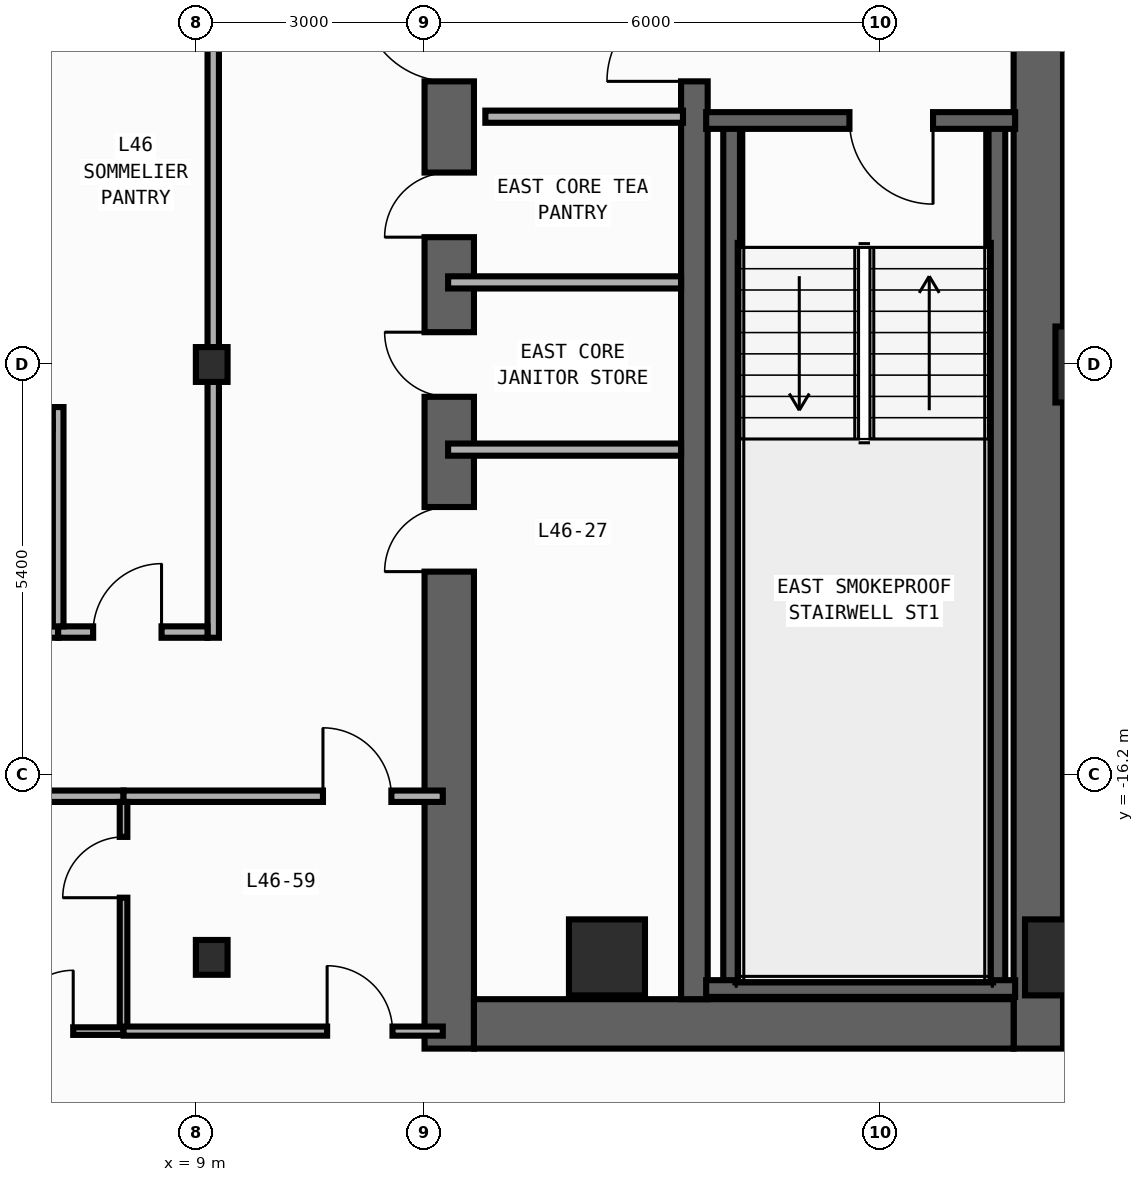
"""IFC4 building model, lengths in metres.
Left out: names, types, materials, properties, quantities, classifications, styles, units other than length and angle.
Written with IfcOpenShell. Run it as: python <this file> out.ifc"""

import sys

from ifc_helpers import new_model, si_unit, direction, frame, frame_2d, origin, origin_2d, place, context, subcontext, project, spatial, rectangle, i_section, extrude, element, fill, save


model = new_model("IFC4")
c1 = context("Model", 3, precision=1e-05, world=origin(), true_north=direction((0.0, 1.0)))
c2 = subcontext(c1, "Body", "Model", "MODEL_VIEW")
j1 = project(units=[si_unit("LENGTHUNIT", "METRE"), si_unit("PLANEANGLEUNIT", "RADIAN")], contexts=[c1])
p1 = place(None, origin())
s1 = spatial("IfcSite", under=j1, at=p1, CompositionType="ELEMENT")
p2 = place(p1, origin())
s2 = spatial("IfcBuilding", under=s1, at=p2, CompositionType="ELEMENT")
p3 = place(p2, frame((0.0, 0.0, 199.2)))
s3 = spatial("IfcBuildingStorey", under=s2, at=p3, CompositionType="ELEMENT", Elevation=199.2)
p4 = place(p3, frame((12.325, -19.8, 0.0), z_axis=(0.0, 0.0, 1.0), x_axis=(0.0, 1.0, 0.0)))
e1 = element("IfcWall", 1, at=p4, inside=s3, PredefinedType="SHEAR", context=c2, shape_type="SweptSolid", body=[
    extrude(rectangle(XDim=27.0, YDim=0.65, at=frame_2d((13.5, 0.0))), origin(), (0.0, 0.0, 1.0), 3.54),
])
p5 = place(p4, frame((23.05, 0.0, 0.0)))
e2 = element("IfcOpeningElement", 2, at=p5, cuts=e1, PredefinedType="OPENING", context=c2, shape_type="SweptSolid", body=[
    extrude(rectangle(XDim=1.1, YDim=2.2, at=frame_2d((0.55, 1.1))), frame((0.0, 0.335, 0.0), z_axis=(0.0, -1.0, 0.0), x_axis=(1.0, 0.0, 0.0)), (0.0, 0.0, 1.0), 0.67),
])
p6 = place(p4, frame((19.85, 0.0, 0.0)))
e3 = element("IfcOpeningElement", 3, at=p6, cuts=e1, PredefinedType="OPENING", context=c2, shape_type="SweptSolid", body=[
    extrude(rectangle(XDim=1.1, YDim=2.2, at=frame_2d((0.55, 1.1))), frame((0.0, 0.335, 0.0), z_axis=(0.0, -1.0, 0.0), x_axis=(1.0, 0.0, 0.0)), (0.0, 0.0, 1.0), 0.67),
])
p7 = place(p4, frame((16.65, 0.0, 0.0)))
e4 = element("IfcOpeningElement", 4, at=p7, cuts=e1, PredefinedType="OPENING", context=c2, shape_type="SweptSolid", body=[
    extrude(rectangle(XDim=1.1, YDim=2.2, at=frame_2d((0.55, 1.1))), frame((0.0, 0.335, 0.0), z_axis=(0.0, -1.0, 0.0), x_axis=(1.0, 0.0, 0.0)), (0.0, 0.0, 1.0), 0.67),
])
p8 = place(p4, frame((6.275, 0.0, 0.0)))
e5 = element("IfcOpeningElement", 5, at=p8, cuts=e1, PredefinedType="OPENING", context=c2, shape_type="SweptSolid", body=[
    extrude(rectangle(XDim=0.85, YDim=2.1, at=frame_2d((0.425, 1.05))), frame((0.0, 0.335, 0.0), z_axis=(0.0, -1.0, 0.0), x_axis=(1.0, 0.0, 0.0)), (0.0, 0.0, 1.0), 0.67),
])
p9 = place(p4, frame((8.575, 0.0, 0.0)))
e6 = element("IfcOpeningElement", 6, at=p9, cuts=e1, PredefinedType="OPENING", context=c2, shape_type="SweptSolid", body=[
    extrude(rectangle(XDim=0.85, YDim=2.1, at=frame_2d((0.425, 1.05))), frame((0.0, 0.335, 0.0), z_axis=(0.0, -1.0, 0.0), x_axis=(1.0, 0.0, 0.0)), (0.0, 0.0, 1.0), 0.67),
])
p10 = place(p4, frame((10.675, 0.0, 0.0)))
e7 = element("IfcOpeningElement", 7, at=p10, cuts=e1, PredefinedType="OPENING", context=c2, shape_type="SweptSolid", body=[
    extrude(rectangle(XDim=0.85, YDim=2.1, at=frame_2d((0.425, 1.05))), frame((0.0, 0.335, 0.0), z_axis=(0.0, -1.0, 0.0), x_axis=(1.0, 0.0, 0.0)), (0.0, 0.0, 1.0), 0.67),
])
p11 = place(p4, frame((12.725, 0.0, 0.0)))
e8 = element("IfcOpeningElement", 8, at=p11, cuts=e1, PredefinedType="OPENING", context=c2, shape_type="SweptSolid", body=[
    extrude(rectangle(XDim=1.15, YDim=2.2, at=frame_2d((0.575, 1.1))), frame((0.0, 0.335, 0.0), z_axis=(0.0, -1.0, 0.0), x_axis=(1.0, 0.0, 0.0)), (0.0, 0.0, 1.0), 0.67),
])
p12 = place(p4, frame((25.125, 0.0, 0.0)))
e9 = element("IfcOpeningElement", 9, at=p12, cuts=e1, PredefinedType="OPENING", context=c2, shape_type="SweptSolid", body=[
    extrude(rectangle(XDim=0.85, YDim=2.1, at=frame_2d((0.425, 1.05))), frame((0.0, 0.335, 0.0), z_axis=(0.0, -1.0, 0.0), x_axis=(1.0, 0.0, 0.0)), (0.0, 0.0, 1.0), 0.67),
])
p13 = place(p3, frame((20.075, -19.8, 0.0), z_axis=(0.0, 0.0, 1.0), x_axis=(0.0, 1.0, 0.0)))
e10 = element("IfcWall", 10, at=p13, inside=s3, PredefinedType="SHEAR", context=c2, shape_type="SweptSolid", body=[
    extrude(rectangle(XDim=27.0, YDim=0.65, at=frame_2d((13.5, 0.0))), origin(), (0.0, 0.0, 1.0), 3.54),
])
p14 = place(p3, frame((12.65, -19.475, 0.0), z_axis=(0.0, 0.0, 1.0), x_axis=(1.0, 0.0, 0.0)))
e11 = element("IfcWall", 11, at=p14, inside=s3, PredefinedType="SHEAR", context=c2, shape_type="SweptSolid", body=[
    extrude(rectangle(XDim=7.1, YDim=0.65, at=frame_2d((3.55, 0.0))), origin(), (0.0, 0.0, 1.0), 3.54),
])
p15 = place(p3, frame((15.55, -19.15, 0.0), z_axis=(0.0, 0.0, 1.0), x_axis=(0.0, 1.0, 0.0)))
e12 = element("IfcWall", 12, at=p15, inside=s3, PredefinedType="SHEAR", context=c2, shape_type="SweptSolid", body=[
    extrude(rectangle(XDim=25.7, YDim=0.35, at=frame_2d((12.85, 0.0))), origin(), (0.0, 0.0, 1.0), 3.54),
])
p16 = place(p15, frame((12.075, 0.0, 0.0)))
e13 = element("IfcOpeningElement", 13, at=p16, cuts=e12, PredefinedType="OPENING", context=c2, shape_type="SweptSolid", body=[
    extrude(rectangle(XDim=1.15, YDim=2.2, at=frame_2d((0.575, 1.1))), frame((0.0, 0.185, 0.0), z_axis=(0.0, -1.0, 0.0), x_axis=(1.0, 0.0, 0.0)), (0.0, 0.0, 1.0), 0.37),
])
p17 = place(p15, frame((24.475, 0.0, 0.0)))
e14 = element("IfcOpeningElement", 14, at=p17, cuts=e12, PredefinedType="OPENING", context=c2, shape_type="SweptSolid", body=[
    extrude(rectangle(XDim=0.85, YDim=2.1, at=frame_2d((0.425, 1.05))), frame((0.0, 0.185, 0.0), z_axis=(0.0, -1.0, 0.0), x_axis=(1.0, 0.0, 0.0)), (0.0, 0.0, 1.0), 0.37),
])
for number, where, z_axis, x_axis in (
    (15, (16.04, -19.01, 0.0), (0.0, 0.0, 1.0), (0.0, 1.0, 0.0)),
    (16, (19.53, -19.01, 0.0), (0.0, 0.0, 1.0), (0.0, 1.0, 0.0)),
):
    element("IfcWall", number, at=place(p3, frame(where, z_axis=z_axis, x_axis=x_axis)), inside=s3, PredefinedType="SHEAR", context=c2, shape_type="SweptSolid", body=[
        extrude(rectangle(XDim=11.42, YDim=0.22, at=frame_2d((5.71, 0.0))), origin(), (0.0, 0.0, 1.0), 3.54),
    ])
p18 = place(p3, frame((15.705, -19.01, 0.0), z_axis=(0.0, 0.0, 1.0), x_axis=(1.0, 0.0, 0.0)))
e17 = element("IfcWall", 17, at=p18, inside=s3, PredefinedType="SHEAR", context=c2, shape_type="SweptSolid", body=[
    extrude(rectangle(XDim=4.065, YDim=0.22, at=frame_2d((2.032, 0.0))), origin(), (0.0, 0.0, 1.0), 3.54),
])
p19 = place(p3, frame((19.77, -7.59, 0.0), z_axis=(0.0, 0.0, 1.0), x_axis=(-1.0, 0.0, 0.0)))
e18 = element("IfcWall", 18, at=p19, inside=s3, PredefinedType="SHEAR", context=c2, shape_type="SweptSolid", body=[
    extrude(rectangle(XDim=4.065, YDim=0.22, at=frame_2d((2.032, 0.0))), origin(), (0.0, 0.0, 1.0), 3.54),
])
p20 = place(p19, frame((1.08, 0.0, 0.0)))
e19 = element("IfcOpeningElement", 19, at=p20, cuts=e18, PredefinedType="OPENING", context=c2, shape_type="SweptSolid", body=[
    extrude(rectangle(XDim=1.1, YDim=2.2, at=frame_2d((0.55, 1.1))), frame((0.0, 0.12, 0.0), z_axis=(0.0, -1.0, 0.0), x_axis=(1.0, 0.0, 0.0)), (0.0, 0.0, 1.0), 0.24),
])
for number, where, z_axis, x_axis in (
    (20, (9.2, -18.6, 0.0), (0.0, 0.0, 1.0), (1.0, 0.0, 0.0)),
    (21, (9.2, -10.8, 0.0), (0.0, 0.0, 1.0), (1.0, 0.0, 0.0)),
):
    element("IfcColumn", number, at=place(p3, frame(where, z_axis=z_axis, x_axis=x_axis)), inside=s3, PredefinedType="COLUMN", context=c2, shape_type="SweptSolid", body=[
        extrude(i_section(OverallWidth=0.417, OverallDepth=0.458, WebThickness=0.03, FlangeThickness=0.05, FilletRadius=0.022, at=origin_2d()), origin(), (0.0, 0.0, 1.0), 3.8),
    ])
for number, where, z_axis, x_axis in (
    (22, (20.4, -18.6, 0.0), (0.0, 0.0, 1.0), (1.0, 0.0, 0.0)),
    (23, (14.4, -18.6, 0.0), (0.0, 0.0, 1.0), (1.0, 0.0, 0.0)),
    (24, (20.8, -10.8, 0.0), (0.0, 0.0, 1.0), (1.0, 0.0, 0.0)),
):
    element("IfcColumn", number, at=place(p3, frame(where, z_axis=z_axis, x_axis=x_axis)), inside=s3, PredefinedType="COLUMN", context=c2, shape_type="SweptSolid", body=[
        extrude(rectangle(XDim=1.0, YDim=1.0, at=origin_2d()), origin(), (0.0, 0.0, 1.0), 3.8),
    ])
p21 = place(p3, frame((12.8, -7.54, 0.0), z_axis=(0.0, 0.0, 1.0), x_axis=(1.0, 0.0, 0.0)))
e25 = element("IfcWall", 25, at=p21, inside=s3, PredefinedType="STANDARD", context=c2, shape_type="SweptSolid", body=[
    extrude(rectangle(XDim=2.6, YDim=0.16, at=frame_2d((1.3, 0.0))), origin(), (0.0, 0.0, 1.0), 3.54),
])
for number, where, z_axis, x_axis in (
    (26, (12.31, -11.92, 0.0), (0.0, 0.0, 1.0), (1.0, 0.0, 0.0)),
    (27, (12.31, -9.72, 0.0), (0.0, 0.0, 1.0), (1.0, 0.0, 0.0)),
):
    element("IfcWall", number, at=place(p3, frame(where, z_axis=z_axis, x_axis=x_axis)), inside=s3, PredefinedType="PARTITIONING", context=c2, shape_type="SweptSolid", body=[
        extrude(rectangle(XDim=3.065, YDim=0.16, at=frame_2d((1.532, 0.0))), origin(), (0.0, 0.0, 1.0), 3.54),
    ])
p22 = place(p3, frame((9.22, -14.395, 0.0), z_axis=(0.0, 0.0, 1.0), x_axis=(0.0, 1.0, 0.0)))
e28 = element("IfcWall", 28, at=p22, inside=s3, PredefinedType="PARTITIONING", context=c2, shape_type="SweptSolid", body=[
    extrude(rectangle(XDim=12.595, YDim=0.15, at=frame_2d((6.297, 0.0))), origin(), (0.0, 0.0, 1.0), 2.952),
])
p23 = place(p22, frame((8.592, 0.0, 0.0)))
e29 = element("IfcOpeningElement", 29, at=p23, cuts=e28, PredefinedType="OPENING", context=c2, shape_type="SweptSolid", body=[
    extrude(rectangle(XDim=0.9, YDim=2.15, at=frame_2d((0.45, 1.075))), frame((0.0, 0.085, 0.0), z_axis=(0.0, -1.0, 0.0), x_axis=(1.0, 0.0, 0.0)), (0.0, 0.0, 1.0), 0.17),
])
p24 = place(p3, frame((4.28, -14.32, 0.0), z_axis=(0.0, 0.0, 1.0), x_axis=(1.0, 0.0, 0.0)))
e30 = element("IfcWall", 30, at=p24, inside=s3, PredefinedType="PARTITIONING", context=c2, shape_type="SweptSolid", body=[
    extrude(rectangle(XDim=2.9, YDim=0.15, at=frame_2d((1.45, 0.0))), origin(), (0.0, 0.0, 1.0), 3.54),
])
p25 = place(p24, frame((1.54, 0.0, 0.0)))
e31 = element("IfcOpeningElement", 31, at=p25, cuts=e30, PredefinedType="OPENING", context=c2, shape_type="SweptSolid", body=[
    extrude(rectangle(XDim=0.9, YDim=2.15, at=frame_2d((0.45, 1.075))), frame((0.0, 0.085, 0.0), z_axis=(0.0, -1.0, 0.0), x_axis=(1.0, 0.0, 0.0)), (0.0, 0.0, 1.0), 0.17),
])
p26 = place(p3, frame((7.18, -14.32, 0.0), z_axis=(0.0, 0.0, 1.0), x_axis=(1.0, 0.0, 0.0)))
e32 = element("IfcWall", 32, at=p26, inside=s3, PredefinedType="PARTITIONING", context=c2, shape_type="SweptSolid", body=[
    extrude(rectangle(XDim=1.965, YDim=0.15, at=frame_2d((0.982, 0.0))), origin(), (0.0, 0.0, 1.0), 3.54),
])
p27 = place(p26, frame((0.46, 0.0, 0.0)))
e33 = element("IfcOpeningElement", 33, at=p27, cuts=e32, PredefinedType="OPENING", context=c2, shape_type="SweptSolid", body=[
    extrude(rectangle(XDim=0.9, YDim=2.15, at=frame_2d((0.45, 1.075))), frame((0.0, 0.085, 0.0), z_axis=(0.0, -1.0, 0.0), x_axis=(1.0, 0.0, 0.0)), (0.0, 0.0, 1.0), 0.17),
])
p28 = place(p3, frame((4.5, -16.48, 0.0), z_axis=(0.0, 0.0, 1.0), x_axis=(1.0, 0.0, 0.0)))
e34 = element("IfcWall", 34, at=p28, inside=s3, PredefinedType="PARTITIONING", context=c2, shape_type="SweptSolid", body=[
    extrude(rectangle(XDim=3.54, YDim=0.15, at=frame_2d((1.77, 0.0))), origin(), (0.0, 0.0, 1.0), 3.54),
])
p29 = place(p3, frame((8.04, -16.48, 0.0), z_axis=(0.0, 0.0, 1.0), x_axis=(1.0, 0.0, 0.0)))
e35 = element("IfcWall", 35, at=p29, inside=s3, PredefinedType="PARTITIONING", context=c2, shape_type="SweptSolid", body=[
    extrude(rectangle(XDim=4.2, YDim=0.15, at=frame_2d((2.1, 0.0))), origin(), (0.0, 0.0, 1.0), 3.54),
])
p30 = place(p29, frame((2.624, 0.0, 0.0)))
e36 = element("IfcOpeningElement", 36, at=p30, cuts=e35, PredefinedType="OPENING", context=c2, shape_type="SweptSolid", body=[
    extrude(rectangle(XDim=0.9, YDim=2.15, at=frame_2d((0.45, 1.075))), frame((0.0, 0.085, 0.0), z_axis=(0.0, -1.0, 0.0), x_axis=(1.0, 0.0, 0.0)), (0.0, 0.0, 1.0), 0.17),
])
p31 = place(p3, frame((7.18, -14.245, 0.0), z_axis=(0.0, 0.0, 1.0), x_axis=(0.0, 1.0, 0.0)))
e37 = element("IfcWall", 37, at=p31, inside=s3, PredefinedType="PARTITIONING", context=c2, shape_type="SweptSolid", body=[
    extrude(rectangle(XDim=2.885, YDim=0.14, at=frame_2d((1.442, 0.0))), origin(), (0.0, 0.0, 1.0), 3.54),
])
p32 = place(p3, frame((8.04, -19.52, 0.0), z_axis=(0.0, 0.0, 1.0), x_axis=(0.0, 1.0, 0.0)))
e38 = element("IfcWall", 38, at=p32, inside=s3, PredefinedType="PARTITIONING", context=c2, shape_type="SweptSolid", body=[
    extrude(rectangle(XDim=2.965, YDim=0.1, at=frame_2d((1.482, 0.0))), origin(), (0.0, 0.0, 1.0), 3.54),
])
p33 = place(p32, frame((1.705, 0.0, 0.0)))
e39 = element("IfcOpeningElement", 39, at=p33, cuts=e38, PredefinedType="OPENING", context=c2, shape_type="SweptSolid", body=[
    extrude(rectangle(XDim=0.8, YDim=2.1, at=frame_2d((0.4, 1.05))), frame((0.0, 0.06, 0.0), z_axis=(0.0, -1.0, 0.0), x_axis=(1.0, 0.0, 0.0)), (0.0, 0.0, 1.0), 0.12),
])
p34 = place(p3, frame((4.5, -19.57, 0.0), z_axis=(0.0, 0.0, 1.0), x_axis=(1.0, 0.0, 0.0)))
e40 = element("IfcWall", 40, at=p34, inside=s3, PredefinedType="PARTITIONING", context=c2, shape_type="SweptSolid", body=[
    extrude(rectangle(XDim=3.54, YDim=0.1, at=frame_2d((1.77, 0.0))), origin(), (0.0, 0.0, 1.0), 3.54),
])
p35 = place(p34, frame((2.078, 0.0, 0.0)))
e41 = element("IfcOpeningElement", 41, at=p35, cuts=e40, PredefinedType="OPENING", context=c2, shape_type="SweptSolid", body=[
    extrude(rectangle(XDim=0.8, YDim=2.1, at=frame_2d((0.4, 1.05))), frame((0.0, 0.06, 0.0), z_axis=(0.0, -1.0, 0.0), x_axis=(1.0, 0.0, 0.0)), (0.0, 0.0, 1.0), 0.12),
])
p36 = place(p3, frame((8.04, -19.57, 0.0), z_axis=(0.0, 0.0, 1.0), x_axis=(1.0, 0.0, 0.0)))
e42 = element("IfcWall", 42, at=p36, inside=s3, PredefinedType="PARTITIONING", context=c2, shape_type="SweptSolid", body=[
    extrude(rectangle(XDim=4.2, YDim=0.12, at=frame_2d((2.1, 0.0))), origin(), (0.0, 0.0, 1.0), 3.54),
])
p37 = place(p36, frame((2.678, 0.0, 0.0)))
e43 = element("IfcOpeningElement", 43, at=p37, cuts=e42, PredefinedType="OPENING", context=c2, shape_type="SweptSolid", body=[
    extrude(rectangle(XDim=0.86, YDim=2.15, at=frame_2d((0.43, 1.075))), frame((0.0, 0.07, 0.0), z_axis=(0.0, -1.0, 0.0), x_axis=(1.0, 0.0, 0.0)), (0.0, 0.0, 1.0), 0.14),
])
p38 = place(p3, frame((4.35, -11.6, 0.0), z_axis=(0.0, 0.0, 1.0), x_axis=(1.0, 0.0, 0.0)))
e44 = element("IfcWall", 44, at=p38, inside=s3, PredefinedType="PARTITIONING", context=c2, shape_type="SweptSolid", body=[
    extrude(rectangle(XDim=2.76, YDim=0.1, at=frame_2d((1.38, 0.0))), origin(), (0.0, 0.0, 1.0), 3.54),
])
p39 = place(p20, origin())
e45 = element("IfcDoor", 45, at=p39, inside=s3, OperationType="SINGLE_SWING_LEFT", PredefinedType="DOOR", context=c2, shape_type="SweptSolid", body=[
    extrude(rectangle(XDim=1.1, YDim=2.2, at=frame_2d((0.55, 1.1))), frame((0.0, 0.025, 0.0), z_axis=(0.0, -1.0, 0.0), x_axis=(1.0, 0.0, 0.0)), (0.0, 0.0, 1.0), 0.05),
])
fill(e19, e45)
p40 = place(p8, origin())
e46 = element("IfcDoor", 46, at=p40, inside=s3, OperationType="SINGLE_SWING_LEFT", PredefinedType="DOOR", context=c2, shape_type="SweptSolid", body=[
    extrude(rectangle(XDim=0.85, YDim=2.1, at=frame_2d((0.425, 1.05))), frame((0.0, 0.025, 0.0), z_axis=(0.0, -1.0, 0.0), x_axis=(1.0, 0.0, 0.0)), (0.0, 0.0, 1.0), 0.05),
])
fill(e5, e46)
p41 = place(p9, origin())
e47 = element("IfcDoor", 47, at=p41, inside=s3, OperationType="SINGLE_SWING_RIGHT", PredefinedType="DOOR", context=c2, shape_type="SweptSolid", body=[
    extrude(rectangle(XDim=0.85, YDim=2.1, at=frame_2d((0.425, 1.05))), frame((0.0, 0.025, 0.0), z_axis=(0.0, -1.0, 0.0), x_axis=(1.0, 0.0, 0.0)), (0.0, 0.0, 1.0), 0.05),
])
fill(e6, e47)
p42 = place(p10, origin())
e48 = element("IfcDoor", 48, at=p42, inside=s3, OperationType="SINGLE_SWING_LEFT", PredefinedType="DOOR", context=c2, shape_type="SweptSolid", body=[
    extrude(rectangle(XDim=0.85, YDim=2.1, at=frame_2d((0.425, 1.05))), frame((0.0, 0.025, 0.0), z_axis=(0.0, -1.0, 0.0), x_axis=(1.0, 0.0, 0.0)), (0.0, 0.0, 1.0), 0.05),
])
fill(e7, e48)
p43 = place(p11, origin())
e49 = element("IfcDoor", 49, at=p43, inside=s3, OperationType="SINGLE_SWING_RIGHT", PredefinedType="DOOR", context=c2, shape_type="SweptSolid", body=[
    extrude(rectangle(XDim=1.15, YDim=2.2, at=frame_2d((0.575, 1.1))), frame((0.0, 0.025, 0.0), z_axis=(0.0, -1.0, 0.0), x_axis=(1.0, 0.0, 0.0)), (0.0, 0.0, 1.0), 0.05),
])
fill(e8, e49)
p44 = place(p16, origin())
e50 = element("IfcDoor", 50, at=p44, inside=s3, OperationType="SINGLE_SWING_LEFT", PredefinedType="DOOR", context=c2, shape_type="SweptSolid", body=[
    extrude(rectangle(XDim=1.15, YDim=2.2, at=frame_2d((0.575, 1.1))), frame((0.0, 0.025, 0.0), z_axis=(0.0, -1.0, 0.0), x_axis=(1.0, 0.0, 0.0)), (0.0, 0.0, 1.0), 0.05),
])
fill(e13, e50)
p45 = place(p27, origin())
e51 = element("IfcDoor", 51, at=p45, inside=s3, OperationType="SINGLE_SWING_RIGHT", PredefinedType="DOOR", context=c2, shape_type="SweptSolid", body=[
    extrude(rectangle(XDim=0.9, YDim=2.15, at=frame_2d((0.45, 1.075))), frame((0.0, 0.025, 0.0), z_axis=(0.0, -1.0, 0.0), x_axis=(1.0, 0.0, 0.0)), (0.0, 0.0, 1.0), 0.05),
])
fill(e33, e51)
p46 = place(p30, origin())
e52 = element("IfcDoor", 52, at=p46, inside=s3, OperationType="SINGLE_SWING_LEFT", PredefinedType="DOOR", context=c2, shape_type="SweptSolid", body=[
    extrude(rectangle(XDim=0.9, YDim=2.15, at=frame_2d((0.45, 1.075))), frame((0.0, 0.025, 0.0), z_axis=(0.0, -1.0, 0.0), x_axis=(1.0, 0.0, 0.0)), (0.0, 0.0, 1.0), 0.05),
])
fill(e36, e52)
p47 = place(p33, origin())
e53 = element("IfcDoor", 53, at=p47, inside=s3, OperationType="SINGLE_SWING_LEFT", PredefinedType="DOOR", context=c2, shape_type="SweptSolid", body=[
    extrude(rectangle(XDim=0.8, YDim=2.1, at=frame_2d((0.4, 1.05))), frame((0.0, 0.025, 0.0), z_axis=(0.0, -1.0, 0.0), x_axis=(1.0, 0.0, 0.0)), (0.0, 0.0, 1.0), 0.05),
])
fill(e39, e53)
p48 = place(p35, origin())
e54 = element("IfcDoor", 54, at=p48, inside=s3, OperationType="SINGLE_SWING_RIGHT", PredefinedType="DOOR", context=c2, shape_type="SweptSolid", body=[
    extrude(rectangle(XDim=0.8, YDim=2.1, at=frame_2d((0.4, 1.05))), frame((0.0, 0.025, 0.0), z_axis=(0.0, -1.0, 0.0), x_axis=(1.0, 0.0, 0.0)), (0.0, 0.0, 1.0), 0.05),
])
fill(e41, e54)
p49 = place(p37, origin())
e55 = element("IfcDoor", 55, at=p49, inside=s3, OperationType="SINGLE_SWING_LEFT", PredefinedType="DOOR", context=c2, shape_type="SweptSolid", body=[
    extrude(rectangle(XDim=0.86, YDim=2.15, at=frame_2d((0.43, 1.075))), frame((0.0, 0.025, 0.0), z_axis=(0.0, -1.0, 0.0), x_axis=(1.0, 0.0, 0.0)), (0.0, 0.0, 1.0), 0.05),
])
fill(e43, e55)
save(model, sys.argv[1])
